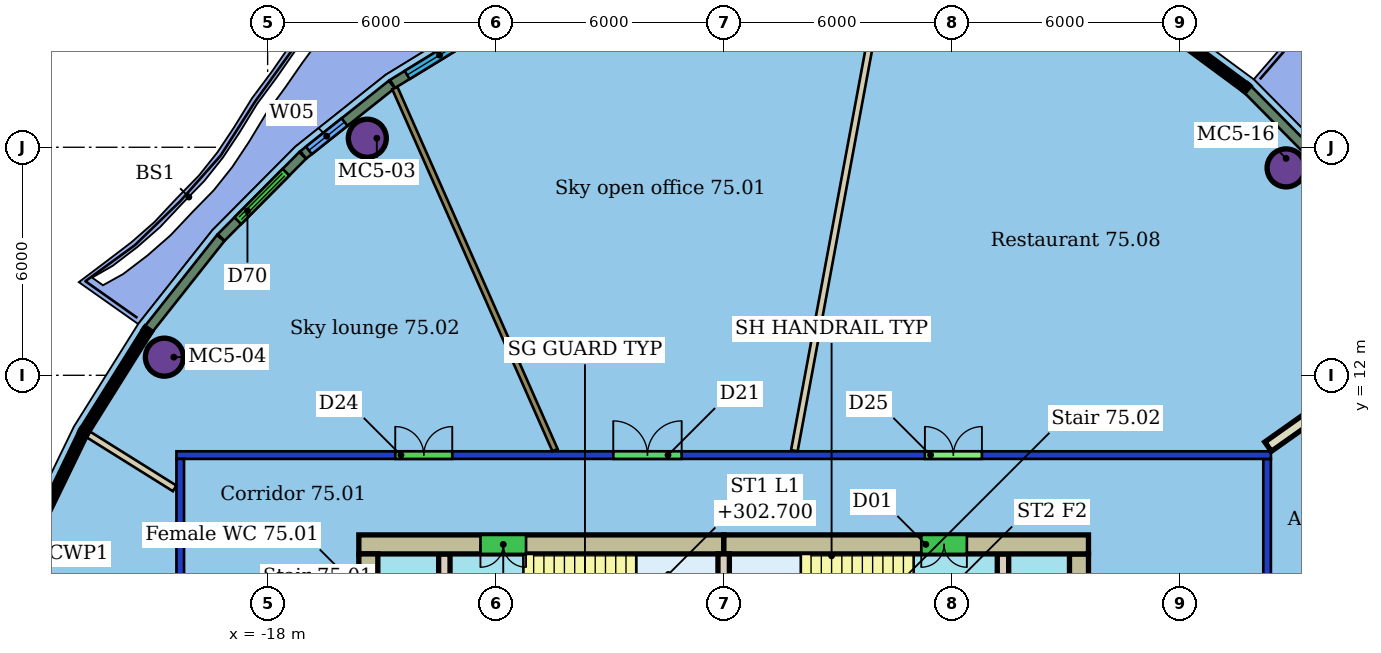
"""IFC4 building model, lengths in metres.
Left out: names, types, materials, properties, quantities, classifications, styles, units other than length and angle.
Written with IfcOpenShell. Run it as: python <this file> out.ifc"""

import sys

from ifc_helpers import new_model, si_unit, direction, frame, frame_2d, origin, origin_2d, place, context, subcontext, project, spatial, rectangle, hollow_circle, extrude, element, fill, save


model = new_model("IFC4")
c1 = context("Model", 3, precision=1e-05, world=origin(), true_north=direction((0.0, 1.0)))
c2 = subcontext(c1, "Body", "Model", "MODEL_VIEW")
j1 = project(units=[si_unit("LENGTHUNIT", "METRE"), si_unit("PLANEANGLEUNIT", "RADIAN")], contexts=[c1])
p1 = place(None, origin())
s1 = spatial("IfcSite", under=j1, at=p1, CompositionType="ELEMENT")
p2 = place(p1, origin())
s2 = spatial("IfcBuilding", under=s1, at=p2, CompositionType="ELEMENT")
p3 = place(p2, frame((0.0, 0.0, 300.9)))
s3 = spatial("IfcBuildingStorey", under=s2, at=p3, CompositionType="ELEMENT", Elevation=300.9)
for number, where, z_axis, x_axis in (
    (1, (-15.377, 18.238, 0.0), (0.0, 0.0, 1.0), (1.0, 0.0, 0.0)),
    (2, (-20.718, 12.477, 0.0), (0.0, 0.0, 1.0), (1.0, 0.0, 0.0)),
    (3, (8.8, 17.457, 0.0), (0.0, 0.0, 1.0), (1.0, 0.0, 0.0)),
):
    element("IfcColumn", number, at=place(p3, frame(where, z_axis=z_axis, x_axis=x_axis)), inside=s3, PredefinedType="COLUMN", context=c2, shape_type="SweptSolid", body=[
        extrude(hollow_circle(Radius=0.5, WallThickness=0.04, at=origin_2d()), origin(), (0.0, 0.0, 1.0), 3.4),
    ])
p4 = place(p3, frame((-20.3, -9.8, 0.0), z_axis=(0.0, 0.0, 1.0), x_axis=(0.0, 1.0, 0.0)))
e4 = element("IfcWall", 4, at=p4, inside=s3, PredefinedType="PARTITIONING", context=c2, shape_type="SweptSolid", body=[
    extrude(rectangle(XDim=19.6, YDim=0.2, at=frame_2d((9.8, 0.0))), origin(), (0.0, 0.0, 1.0), 3.05),
])
p5 = place(p4, frame((11.872, 0.0, 0.0)))
e5 = element("IfcOpeningElement", 5, at=p5, cuts=e4, PredefinedType="OPENING", context=c2, shape_type="SweptSolid", body=[
    extrude(rectangle(XDim=1.5, YDim=2.4, at=frame_2d((0.75, 1.2))), frame((0.0, 0.11, 0.0), z_axis=(0.0, -1.0, 0.0), x_axis=(1.0, 0.0, 0.0)), (0.0, 0.0, 1.0), 0.22),
])
p6 = place(p3, frame((-20.4, 9.9, 0.0), z_axis=(0.0, 0.0, 1.0), x_axis=(1.0, 0.0, 0.0)))
e6 = element("IfcWall", 6, at=p6, inside=s3, PredefinedType="PARTITIONING", context=c2, shape_type="SweptSolid", body=[
    extrude(rectangle(XDim=28.8, YDim=0.2, at=frame_2d((14.4, 0.0))), origin(), (0.0, 0.0, 1.0), 3.05),
])
p7 = place(p6, frame((11.495, 0.0, 0.0)))
e7 = element("IfcOpeningElement", 7, at=p7, cuts=e6, PredefinedType="OPENING", context=c2, shape_type="SweptSolid", body=[
    extrude(rectangle(XDim=1.8, YDim=2.1, at=frame_2d((0.9, 1.05))), frame((0.0, 0.11, 0.0), z_axis=(0.0, -1.0, 0.0), x_axis=(1.0, 0.0, 0.0)), (0.0, 0.0, 1.0), 0.22),
])
p8 = place(p6, frame((5.758, 0.0, 0.0)))
e8 = element("IfcOpeningElement", 8, at=p8, cuts=e6, PredefinedType="OPENING", context=c2, shape_type="SweptSolid", body=[
    extrude(rectangle(XDim=1.5, YDim=2.1, at=frame_2d((0.75, 1.05))), frame((0.0, 0.11, 0.0), z_axis=(0.0, -1.0, 0.0), x_axis=(1.0, 0.0, 0.0)), (0.0, 0.0, 1.0), 0.22),
])
p9 = place(p6, frame((19.695, 0.0, 0.0)))
e9 = element("IfcOpeningElement", 9, at=p9, cuts=e6, PredefinedType="OPENING", context=c2, shape_type="SweptSolid", body=[
    extrude(rectangle(XDim=1.5, YDim=2.4, at=frame_2d((0.75, 1.2))), frame((0.0, 0.11, 0.0), z_axis=(0.0, -1.0, 0.0), x_axis=(1.0, 0.0, 0.0)), (0.0, 0.0, 1.0), 0.22),
])
p10 = place(p3, frame((8.3, 9.8, 0.0), z_axis=(0.0, 0.0, 1.0), x_axis=(0.0, -1.0, 0.0)))
e10 = element("IfcWall", 10, at=p10, inside=s3, PredefinedType="PARTITIONING", context=c2, shape_type="SweptSolid", body=[
    extrude(rectangle(XDim=19.6, YDim=0.2, at=frame_2d((9.8, 0.0))), origin(), (0.0, 0.0, 1.0), 3.05),
])
p11 = place(p10, frame((11.636, 0.0, 0.0)))
e11 = element("IfcOpeningElement", 11, at=p11, cuts=e10, PredefinedType="OPENING", context=c2, shape_type="SweptSolid", body=[
    extrude(rectangle(XDim=1.8, YDim=2.4, at=frame_2d((0.9, 1.2))), frame((0.0, 0.11, 0.0), z_axis=(0.0, -1.0, 0.0), x_axis=(1.0, 0.0, 0.0)), (0.0, 0.0, 1.0), 0.22),
])
p12 = place(p3, frame((-1.658, 23.387, 0.0), z_axis=(0.0, 0.0, 1.0), x_axis=(-0.1825398841, -0.983198449303, 0.0)))
e12 = element("IfcWall", 12, at=p12, inside=s3, PredefinedType="PARTITIONING", context=c2, shape_type="SweptSolid", body=[
    extrude(rectangle(XDim=13.599, YDim=0.175, at=frame_2d((6.8, 0.0))), origin(), (0.0, 0.0, 1.0), 3.4),
])
p13 = place(p3, frame((-14.652, 19.557, 0.0), z_axis=(0.0, 0.0, 1.0), x_axis=(0.4045614234, -0.914510828091, 0.0)))
e13 = element("IfcWall", 13, at=p13, inside=s3, PredefinedType="PARTITIONING", context=c2, shape_type="SweptSolid", body=[
    extrude(rectangle(XDim=10.418, YDim=0.15, at=frame_2d((5.209, 0.0))), origin(), (0.0, 0.0, 1.0), 3.4),
])
p14 = place(p3, frame((-22.724, 10.447, 0.0), z_axis=(0.0, 0.0, 1.0), x_axis=(0.848115728247, -0.529811014891, 0.0)))
e14 = element("IfcWall", 14, at=p14, inside=s3, PredefinedType="PARTITIONING", context=c2, shape_type="SweptSolid", body=[
    extrude(rectangle(XDim=2.686, YDim=0.175, at=frame_2d((1.343, 0.0))), origin(), (0.0, 0.0, 1.0), 3.4),
])
p15 = place(p3, frame((12.396, 12.998, 0.0), z_axis=(0.0, 0.0, 1.0), x_axis=(-0.816698923904, -0.577064006583, 0.0)))
e15 = element("IfcWall", 15, at=p15, inside=s3, PredefinedType="PARTITIONING", context=c2, shape_type="SweptSolid", body=[
    extrude(rectangle(XDim=4.983, YDim=0.3, at=frame_2d((2.491, 0.0))), origin(), (0.0, 0.0, 1.0), 3.4),
])
p16 = place(p3, frame((-12.238, 21.183, 0.0), z_axis=(0.0, 0.0, 1.0), x_axis=(-0.852693082588, -0.522412200189, 0.0)))
e16 = element("IfcWall", 16, at=p16, inside=s3, PredefinedType="SOLIDWALL", context=c2, shape_type="SweptSolid", body=[
    extrude(rectangle(XDim=2.904, YDim=0.25, at=frame_2d((1.452, 0.0))), origin(), (0.0, 0.0, 1.0), 3.1),
])
p17 = place(p16, frame((0.452, 0.0, 0.9)))
e17 = element("IfcOpeningElement", 17, at=p17, cuts=e16, PredefinedType="OPENING", context=c2, shape_type="SweptSolid", body=[
    extrude(rectangle(XDim=2.0, YDim=2.1, at=frame_2d((1.0, 1.05))), frame((0.0, 0.135, 0.0), z_axis=(0.0, -1.0, 0.0), x_axis=(1.0, 0.0, 0.0)), (0.0, 0.0, 1.0), 0.27),
])
p18 = place(p3, frame((-14.733, 19.652, 0.0), z_axis=(0.0, 0.0, 1.0), x_axis=(-0.782610135425, -0.622512149222, 0.0)))
e18 = element("IfcWall", 18, at=p18, inside=s3, PredefinedType="SOLIDWALL", context=c2, shape_type="SweptSolid", body=[
    extrude(rectangle(XDim=2.977, YDim=0.25, at=frame_2d((1.488, 0.0))), origin(), (0.0, 0.0, 1.0), 3.1),
])
p19 = place(p18, frame((1.588, 0.0, 0.9)))
e19 = element("IfcOpeningElement", 19, at=p19, cuts=e18, PredefinedType="OPENING", context=c2, shape_type="SweptSolid", body=[
    extrude(rectangle(XDim=1.2, YDim=2.1, at=frame_2d((0.6, 1.05))), frame((0.0, 0.135, 0.0), z_axis=(0.0, -1.0, 0.0), x_axis=(1.0, 0.0, 0.0)), (0.0, 0.0, 1.0), 0.27),
])
p20 = place(p3, frame((-17.08, 17.784, 0.0), z_axis=(0.0, 0.0, 1.0), x_axis=(-0.704653875191, -0.709551207581, 0.0)))
e20 = element("IfcWall", 20, at=p20, inside=s3, PredefinedType="SOLIDWALL", context=c2, shape_type="SweptSolid", body=[
    extrude(rectangle(XDim=3.041, YDim=0.25, at=frame_2d((1.521, 0.0))), origin(), (0.0, 0.0, 1.0), 3.1),
])
p21 = place(p20, frame((0.62, 0.0, 0.0)))
e21 = element("IfcOpeningElement", 21, at=p21, cuts=e20, PredefinedType="OPENING", context=c2, shape_type="SweptSolid", body=[
    extrude(rectangle(XDim=1.8, YDim=2.4, at=frame_2d((0.9, 1.2))), frame((0.0, 0.135, 0.0), z_axis=(0.0, -1.0, 0.0), x_axis=(1.0, 0.0, 0.0)), (0.0, 0.0, 1.0), 0.27),
])
p22 = place(p3, frame((-19.237, 15.61, 0.0), z_axis=(0.0, 0.0, 1.0), x_axis=(-0.620358215529, -0.784318611551, 0.0)))
e22 = element("IfcWall", 22, at=p22, inside=s3, PredefinedType="SOLIDWALL", context=c2, shape_type="SweptSolid", body=[
    extrude(rectangle(XDim=3.048, YDim=0.25, at=frame_2d((1.524, 0.0))), origin(), (0.0, 0.0, 1.0), 3.1),
])
p23 = place(p3, frame((9.603, 17.69, 0.0), z_axis=(0.0, 0.0, 1.0), x_axis=(-0.70340049818, 0.71079373883, 0.0)))
e23 = element("IfcWall", 23, at=p23, inside=s3, PredefinedType="SOLIDWALL", context=c2, shape_type="SweptSolid", body=[
    extrude(rectangle(XDim=2.576, YDim=0.25, at=frame_2d((1.288, 0.0))), origin(), (0.0, 0.0, 1.0), 3.1),
])
p24 = place(p3, frame((3.6, 7.55, 0.0), z_axis=(0.0, 0.0, 1.0), x_axis=(-1.0, 0.0, 0.0)))
e24 = element("IfcWall", 24, at=p24, inside=s3, PredefinedType="SHEAR", context=c2, shape_type="SweptSolid", body=[
    extrude(rectangle(XDim=9.6, YDim=0.5, at=frame_2d((4.8, 0.0))), origin(), (0.0, 0.0, 1.0), 3.3),
])
p25 = place(p24, frame((3.2, 0.0, 0.0)))
e25 = element("IfcOpeningElement", 25, at=p25, cuts=e24, PredefinedType="OPENING", context=c2, shape_type="SweptSolid", body=[
    extrude(rectangle(XDim=1.2, YDim=2.1, at=frame_2d((0.6, 1.05))), frame((0.0, 0.26, 0.0), z_axis=(0.0, -1.0, 0.0), x_axis=(1.0, 0.0, 0.0)), (0.0, 0.0, 1.0), 0.52),
])
p26 = place(p3, frame((-6.0, 7.55, 0.0), z_axis=(0.0, 0.0, 1.0), x_axis=(-1.0, 0.0, 0.0)))
e26 = element("IfcWall", 26, at=p26, inside=s3, PredefinedType="SHEAR", context=c2, shape_type="SweptSolid", body=[
    extrude(rectangle(XDim=9.6, YDim=0.5, at=frame_2d((4.8, 0.0))), origin(), (0.0, 0.0, 1.0), 3.3),
])
p27 = place(p26, frame((5.2, 0.0, 0.0)))
e27 = element("IfcOpeningElement", 27, at=p27, cuts=e26, PredefinedType="OPENING", context=c2, shape_type="SweptSolid", body=[
    extrude(rectangle(XDim=1.2, YDim=2.1, at=frame_2d((0.6, 1.05))), frame((0.0, 0.26, 0.0), z_axis=(0.0, -1.0, 0.0), x_axis=(1.0, 0.0, 0.0)), (0.0, 0.0, 1.0), 0.52),
])
p28 = place(p3, frame((-15.35, 7.3, 0.0), z_axis=(0.0, 0.0, 1.0), x_axis=(0.0, -1.0, 0.0)))
e28 = element("IfcWall", 28, at=p28, inside=s3, PredefinedType="SHEAR", context=c2, shape_type="SweptSolid", body=[
    extrude(rectangle(XDim=14.6, YDim=0.5, at=frame_2d((7.3, 0.0))), origin(), (0.0, 0.0, 1.0), 3.3),
])
p29 = place(p28, frame((10.6, 0.0, 0.0)))
e29 = element("IfcOpeningElement", 29, at=p29, cuts=e28, PredefinedType="OPENING", context=c2, shape_type="SweptSolid", body=[
    extrude(rectangle(XDim=1.2, YDim=2.1, at=frame_2d((0.6, 1.05))), frame((0.0, 0.26, 0.0), z_axis=(0.0, -1.0, 0.0), x_axis=(1.0, 0.0, 0.0)), (0.0, 0.0, 1.0), 0.52),
])
p30 = place(p28, frame((2.8, 0.0, 0.0)))
e30 = element("IfcOpeningElement", 30, at=p30, cuts=e28, PredefinedType="OPENING", context=c2, shape_type="SweptSolid", body=[
    extrude(rectangle(XDim=1.2, YDim=2.1, at=frame_2d((0.6, 1.05))), frame((0.0, 0.26, 0.0), z_axis=(0.0, -1.0, 0.0), x_axis=(1.0, 0.0, 0.0)), (0.0, 0.0, 1.0), 0.52),
])
p31 = place(p3, frame((3.35, -7.3, 0.0), z_axis=(0.0, 0.0, 1.0), x_axis=(0.0, 1.0, 0.0)))
e31 = element("IfcWall", 31, at=p31, inside=s3, PredefinedType="SHEAR", context=c2, shape_type="SweptSolid", body=[
    extrude(rectangle(XDim=14.6, YDim=0.5, at=frame_2d((7.3, 0.0))), origin(), (0.0, 0.0, 1.0), 3.3),
])
p32 = place(p31, frame((2.8, 0.0, 0.0)))
e32 = element("IfcOpeningElement", 32, at=p32, cuts=e31, PredefinedType="OPENING", context=c2, shape_type="SweptSolid", body=[
    extrude(rectangle(XDim=1.2, YDim=2.1, at=frame_2d((0.6, 1.05))), frame((0.0, 0.26, 0.0), z_axis=(0.0, -1.0, 0.0), x_axis=(1.0, 0.0, 0.0)), (0.0, 0.0, 1.0), 0.52),
])
p33 = place(p31, frame((10.6, 0.0, 0.0)))
e33 = element("IfcOpeningElement", 33, at=p33, cuts=e31, PredefinedType="OPENING", context=c2, shape_type="SweptSolid", body=[
    extrude(rectangle(XDim=1.2, YDim=2.1, at=frame_2d((0.6, 1.05))), frame((0.0, 0.26, 0.0), z_axis=(0.0, -1.0, 0.0), x_axis=(1.0, 0.0, 0.0)), (0.0, 0.0, 1.0), 0.52),
])
p34 = place(p3, frame((-13.35, 7.3, 0.0), z_axis=(0.0, 0.0, 1.0), x_axis=(0.0, -1.0, 0.0)))
e34 = element("IfcWall", 34, at=p34, inside=s3, PredefinedType="SHEAR", context=c2, shape_type="SweptSolid", body=[
    extrude(rectangle(XDim=14.6, YDim=0.3, at=frame_2d((7.3, 0.0))), origin(), (0.0, 0.0, 1.0), 3.3),
])
p35 = place(p34, frame((6.55, 0.0, 0.0)))
e35 = element("IfcOpeningElement", 35, at=p35, cuts=e34, PredefinedType="OPENING", context=c2, shape_type="SweptSolid", body=[
    extrude(rectangle(XDim=1.5, YDim=2.1, at=frame_2d((0.75, 1.05))), frame((0.0, 0.16, 0.0), z_axis=(0.0, -1.0, 0.0), x_axis=(1.0, 0.0, 0.0)), (0.0, 0.0, 1.0), 0.32),
])
p36 = place(p3, frame((1.35, -7.3, 0.0), z_axis=(0.0, 0.0, 1.0), x_axis=(0.0, 1.0, 0.0)))
e36 = element("IfcWall", 36, at=p36, inside=s3, PredefinedType="SHEAR", context=c2, shape_type="SweptSolid", body=[
    extrude(rectangle(XDim=14.6, YDim=0.3, at=frame_2d((7.3, 0.0))), origin(), (0.0, 0.0, 1.0), 3.3),
])
p37 = place(p36, frame((1.21, 0.0, 0.0)))
e37 = element("IfcOpeningElement", 37, at=p37, cuts=e36, PredefinedType="OPENING", context=c2, shape_type="SweptSolid", body=[
    extrude(rectangle(XDim=1.0, YDim=2.1, at=frame_2d((0.5, 1.05))), frame((0.0, 0.16, 0.0), z_axis=(0.0, -1.0, 0.0), x_axis=(1.0, 0.0, 0.0)), (0.0, 0.0, 1.0), 0.32),
])
p38 = place(p36, frame((6.55, 0.0, 0.0)))
e38 = element("IfcOpeningElement", 38, at=p38, cuts=e36, PredefinedType="OPENING", context=c2, shape_type="SweptSolid", body=[
    extrude(rectangle(XDim=1.5, YDim=2.1, at=frame_2d((0.75, 1.05))), frame((0.0, 0.16, 0.0), z_axis=(0.0, -1.0, 0.0), x_axis=(1.0, 0.0, 0.0)), (0.0, 0.0, 1.0), 0.32),
])
p39 = place(p3, frame((-6.0, 3.88, 0.0), z_axis=(0.0, 0.0, 1.0), x_axis=(0.0, 1.0, 0.0)))
e39 = element("IfcWall", 39, at=p39, inside=s3, PredefinedType="SHEAR", context=c2, shape_type="SweptSolid", body=[
    extrude(rectangle(XDim=3.42, YDim=0.3, at=frame_2d((1.71, 0.0))), origin(), (0.0, 0.0, 1.0), 3.3),
])
p40 = place(p7, origin())
e40 = element("IfcDoor", 40, at=p40, inside=s3, OperationType="DOUBLE_DOOR_SINGLE_SWING", PredefinedType="DOOR", context=c2, shape_type="SweptSolid", body=[
    extrude(rectangle(XDim=1.8, YDim=2.1, at=frame_2d((0.9, 1.05))), frame((0.0, 0.025, 0.0), z_axis=(0.0, -1.0, 0.0), x_axis=(1.0, 0.0, 0.0)), (0.0, 0.0, 1.0), 0.05),
])
fill(e7, e40)
p41 = place(p8, origin())
e41 = element("IfcDoor", 41, at=p41, inside=s3, OperationType="DOUBLE_DOOR_SINGLE_SWING", PredefinedType="DOOR", context=c2, shape_type="SweptSolid", body=[
    extrude(rectangle(XDim=1.5, YDim=2.1, at=frame_2d((0.75, 1.05))), frame((0.0, 0.025, 0.0), z_axis=(0.0, -1.0, 0.0), x_axis=(1.0, 0.0, 0.0)), (0.0, 0.0, 1.0), 0.05),
])
fill(e8, e41)
p42 = place(p9, origin())
e42 = element("IfcDoor", 42, at=p42, inside=s3, OperationType="DOUBLE_DOOR_SINGLE_SWING", PredefinedType="DOOR", context=c2, shape_type="SweptSolid", body=[
    extrude(rectangle(XDim=1.5, YDim=2.4, at=frame_2d((0.75, 1.2))), frame((0.0, 0.025, 0.0), z_axis=(0.0, -1.0, 0.0), x_axis=(1.0, 0.0, 0.0)), (0.0, 0.0, 1.0), 0.05),
])
fill(e9, e42)
p43 = place(p17, origin())
e43 = element("IfcWindow", 43, at=p43, inside=s3, PartitioningType="SINGLE_PANEL", PredefinedType="WINDOW", context=c2, shape_type="SweptSolid", body=[
    extrude(rectangle(XDim=2.0, YDim=2.1, at=frame_2d((1.0, 1.05))), frame((0.0, 0.03, 0.0), z_axis=(0.0, -1.0, 0.0), x_axis=(1.0, 0.0, 0.0)), (0.0, 0.0, 1.0), 0.06),
])
fill(e17, e43)
p44 = place(p19, origin())
e44 = element("IfcWindow", 44, at=p44, inside=s3, PartitioningType="SINGLE_PANEL", PredefinedType="WINDOW", context=c2, shape_type="SweptSolid", body=[
    extrude(rectangle(XDim=1.2, YDim=2.1, at=frame_2d((0.6, 1.05))), frame((0.0, 0.03, 0.0), z_axis=(0.0, -1.0, 0.0), x_axis=(1.0, 0.0, 0.0)), (0.0, 0.0, 1.0), 0.06),
])
fill(e19, e44)
p45 = place(p21, origin())
e45 = element("IfcDoor", 45, at=p45, inside=s3, OperationType="DOUBLE_DOOR_SLIDING", PredefinedType="DOOR", context=c2, shape_type="SweptSolid", body=[
    extrude(rectangle(XDim=1.8, YDim=2.4, at=frame_2d((0.9, 1.2))), frame((0.0, 0.025, 0.0), z_axis=(0.0, -1.0, 0.0), x_axis=(1.0, 0.0, 0.0)), (0.0, 0.0, 1.0), 0.05),
])
fill(e21, e45)
p46 = place(p25, origin())
e46 = element("IfcDoor", 46, at=p46, inside=s3, OperationType="DOUBLE_DOOR_SINGLE_SWING", PredefinedType="NOTDEFINED", context=c2, shape_type="SweptSolid", body=[
    extrude(rectangle(XDim=1.2, YDim=2.1, at=frame_2d((0.6, 1.05))), frame((0.0, 0.025, 0.0), z_axis=(0.0, -1.0, 0.0), x_axis=(1.0, 0.0, 0.0)), (0.0, 0.0, 1.0), 0.05),
])
fill(e25, e46)
p47 = place(p27, origin())
e47 = element("IfcDoor", 47, at=p47, inside=s3, OperationType="DOUBLE_DOOR_SINGLE_SWING", PredefinedType="NOTDEFINED", context=c2, shape_type="SweptSolid", body=[
    extrude(rectangle(XDim=1.2, YDim=2.1, at=frame_2d((0.6, 1.05))), frame((0.0, 0.025, 0.0), z_axis=(0.0, -1.0, 0.0), x_axis=(1.0, 0.0, 0.0)), (0.0, 0.0, 1.0), 0.05),
])
fill(e27, e47)
save(model, sys.argv[1])
